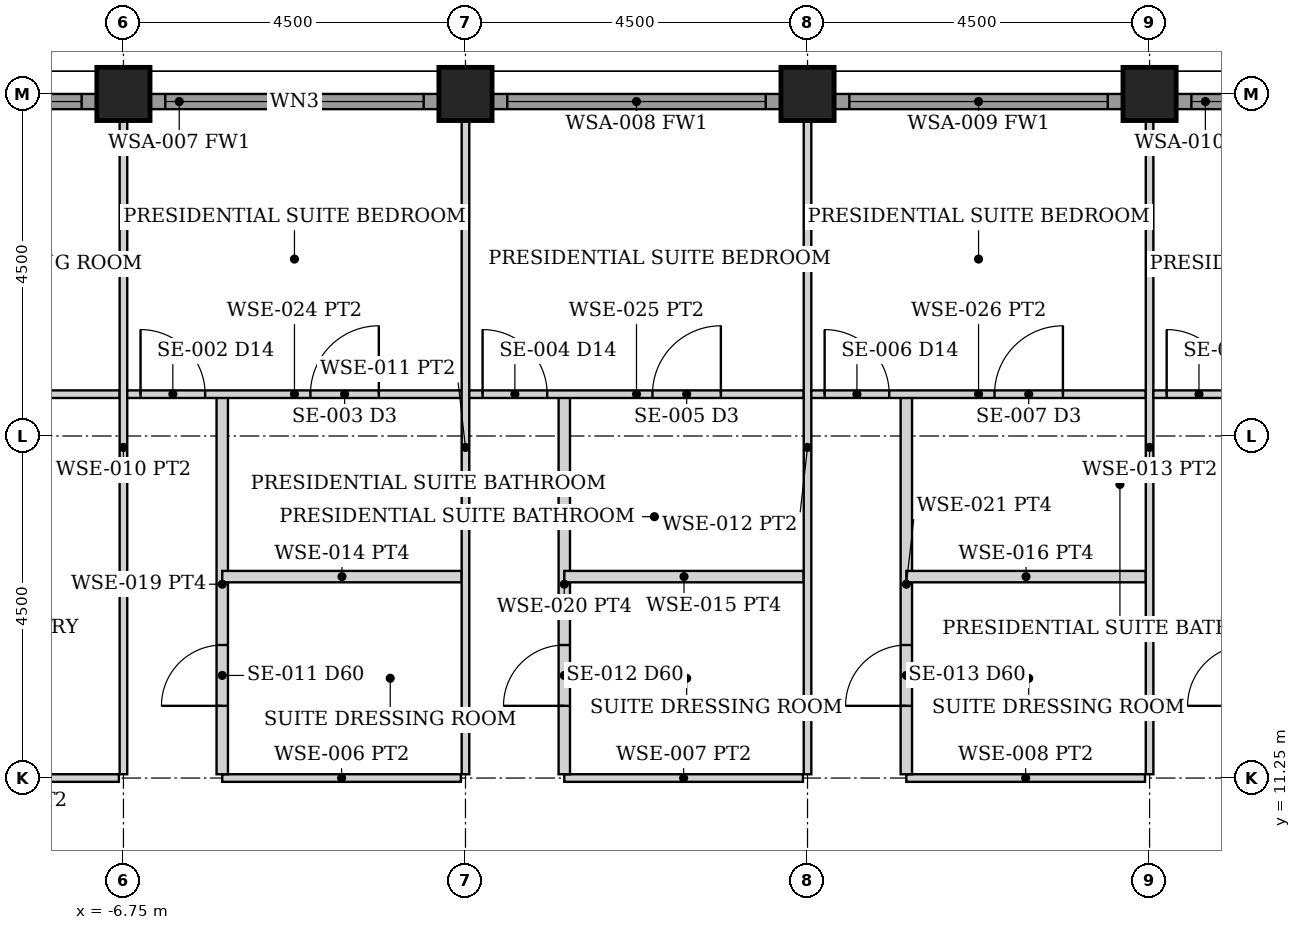
"""IFC4 building model, lengths in metres.
Left out: names, types, materials, properties, quantities, classifications, styles, units other than length and angle.
Written with IfcOpenShell. Run it as: python <this file> out.ifc"""

import sys

from ifc_helpers import new_model, si_unit, direction, frame, frame_2d, origin, origin_2d, place, context, subcontext, project, spatial, rectangle, hollow_rectangle, extrude, element, fill, save


model = new_model("IFC4")
c1 = context("Model", 3, precision=1e-05, world=origin(), true_north=direction((0.0, 1.0)))
c2 = subcontext(c1, "Body", "Model", "MODEL_VIEW")
j1 = project(units=[si_unit("LENGTHUNIT", "METRE"), si_unit("PLANEANGLEUNIT", "RADIAN")], contexts=[c1])
p1 = place(None, origin())
s1 = spatial("IfcSite", under=j1, at=p1, CompositionType="ELEMENT")
p2 = place(p1, origin())
s2 = spatial("IfcBuilding", under=s1, at=p2, CompositionType="ELEMENT")
p3 = place(p2, frame((0.0, 0.0, 245.8)))
s3 = spatial("IfcBuildingStorey", under=s2, at=p3, CompositionType="ELEMENT", Elevation=245.8)
for number, where, z_axis, x_axis in (
    (1, (-6.75, 20.25, 0.0), (0.0, 0.0, 1.0), (0.0, 1.0, 0.0)),
    (2, (-2.25, 20.25, 0.0), (0.0, 0.0, 1.0), (0.0, 1.0, 0.0)),
    (3, (2.25, 20.25, 0.0), (0.0, 0.0, 1.0), (0.0, 1.0, 0.0)),
    (4, (6.75, 20.25, 0.0), (0.0, 0.0, 1.0), (0.0, 1.0, 0.0)),
):
    element("IfcColumn", number, at=place(p3, frame(where, z_axis=z_axis, x_axis=x_axis)), inside=s3, PredefinedType="COLUMN", context=c2, shape_type="SweptSolid", body=[
        extrude(hollow_rectangle(XDim=0.7, YDim=0.7, WallThickness=0.035, at=origin_2d()), origin(), (0.0, 0.0, 1.0), 3.75),
    ])
p4 = place(p3, frame((-10.895, 20.15, 0.0), z_axis=(0.0, 0.0, 1.0), x_axis=(1.0, 0.0, 0.0)))
e5 = element("IfcWall", 5, at=p4, inside=s3, PredefinedType="SOLIDWALL", context=c2, shape_type="SweptSolid", body=[
    extrude(rectangle(XDim=3.79, YDim=0.2, at=frame_2d((1.895, 0.0))), origin(), (0.0, 0.0, 1.0), 2.629),
])
p5 = place(p4, frame((0.195, 0.0, 0.3)))
e6 = element("IfcOpeningElement", 6, at=p5, cuts=e5, PredefinedType="OPENING", context=c2, shape_type="SweptSolid", body=[
    extrude(rectangle(XDim=3.4, YDim=2.179, at=frame_2d((1.7, 1.089))), frame((0.0, 0.11, 0.0), z_axis=(0.0, -1.0, 0.0), x_axis=(1.0, 0.0, 0.0)), (0.0, 0.0, 1.0), 0.22),
])
p6 = place(p3, frame((-6.395, 20.15, 0.0), z_axis=(0.0, 0.0, 1.0), x_axis=(1.0, 0.0, 0.0)))
e7 = element("IfcWall", 7, at=p6, inside=s3, PredefinedType="SOLIDWALL", context=c2, shape_type="SweptSolid", body=[
    extrude(rectangle(XDim=3.79, YDim=0.2, at=frame_2d((1.895, 0.0))), origin(), (0.0, 0.0, 1.0), 2.629),
])
p7 = place(p6, frame((0.195, 0.0, 0.3)))
e8 = element("IfcOpeningElement", 8, at=p7, cuts=e7, PredefinedType="OPENING", context=c2, shape_type="SweptSolid", body=[
    extrude(rectangle(XDim=3.4, YDim=2.179, at=frame_2d((1.7, 1.089))), frame((0.0, 0.11, 0.0), z_axis=(0.0, -1.0, 0.0), x_axis=(1.0, 0.0, 0.0)), (0.0, 0.0, 1.0), 0.22),
])
p8 = place(p3, frame((-1.895, 20.15, 0.0), z_axis=(0.0, 0.0, 1.0), x_axis=(1.0, 0.0, 0.0)))
e9 = element("IfcWall", 9, at=p8, inside=s3, PredefinedType="SOLIDWALL", context=c2, shape_type="SweptSolid", body=[
    extrude(rectangle(XDim=3.79, YDim=0.2, at=frame_2d((1.895, 0.0))), origin(), (0.0, 0.0, 1.0), 2.629),
])
p9 = place(p8, frame((0.195, 0.0, 0.3)))
e10 = element("IfcOpeningElement", 10, at=p9, cuts=e9, PredefinedType="OPENING", context=c2, shape_type="SweptSolid", body=[
    extrude(rectangle(XDim=3.4, YDim=2.179, at=frame_2d((1.7, 1.089))), frame((0.0, 0.11, 0.0), z_axis=(0.0, -1.0, 0.0), x_axis=(1.0, 0.0, 0.0)), (0.0, 0.0, 1.0), 0.22),
])
p10 = place(p3, frame((2.605, 20.15, 0.0), z_axis=(0.0, 0.0, 1.0), x_axis=(1.0, 0.0, 0.0)))
e11 = element("IfcWall", 11, at=p10, inside=s3, PredefinedType="SOLIDWALL", context=c2, shape_type="SweptSolid", body=[
    extrude(rectangle(XDim=3.79, YDim=0.2, at=frame_2d((1.895, 0.0))), origin(), (0.0, 0.0, 1.0), 2.629),
])
p11 = place(p10, frame((0.195, 0.0, 0.3)))
e12 = element("IfcOpeningElement", 12, at=p11, cuts=e11, PredefinedType="OPENING", context=c2, shape_type="SweptSolid", body=[
    extrude(rectangle(XDim=3.4, YDim=2.179, at=frame_2d((1.7, 1.089))), frame((0.0, 0.11, 0.0), z_axis=(0.0, -1.0, 0.0), x_axis=(1.0, 0.0, 0.0)), (0.0, 0.0, 1.0), 0.22),
])
p12 = place(p3, frame((7.105, 20.15, 0.0), z_axis=(0.0, 0.0, 1.0), x_axis=(1.0, 0.0, 0.0)))
e13 = element("IfcWall", 13, at=p12, inside=s3, PredefinedType="SOLIDWALL", context=c2, shape_type="SweptSolid", body=[
    extrude(rectangle(XDim=3.79, YDim=0.2, at=frame_2d((1.895, 0.0))), origin(), (0.0, 0.0, 1.0), 2.629),
])
p13 = place(p12, frame((0.195, 0.0, 0.3)))
e14 = element("IfcOpeningElement", 14, at=p13, cuts=e13, PredefinedType="OPENING", context=c2, shape_type="SweptSolid", body=[
    extrude(rectangle(XDim=3.4, YDim=2.179, at=frame_2d((1.7, 1.089))), frame((0.0, 0.11, 0.0), z_axis=(0.0, -1.0, 0.0), x_axis=(1.0, 0.0, 0.0)), (0.0, 0.0, 1.0), 0.22),
])
p14 = place(p3, frame((-9.95, 11.25, 0.0), z_axis=(0.0, 0.0, 1.0), x_axis=(1.0, 0.0, 0.0)))
e15 = element("IfcWall", 15, at=p14, inside=s3, PredefinedType="PARTITIONING", context=c2, shape_type="SweptSolid", body=[
    extrude(rectangle(XDim=3.14, YDim=0.1, at=frame_2d((1.57, 0.0))), origin(), (0.0, 0.0, 1.0), 2.629),
])
p15 = place(p3, frame((-11.19, 16.3, 0.0), z_axis=(0.0, 0.0, 1.0), x_axis=(1.0, 0.0, 0.0)))
e16 = element("IfcWall", 16, at=p15, inside=s3, PredefinedType="PARTITIONING", context=c2, shape_type="SweptSolid", body=[
    extrude(rectangle(XDim=4.39, YDim=0.1, at=frame_2d((2.195, 0.0))), origin(), (0.0, 0.0, 1.0), 2.629),
])
p16 = place(p15, frame((0.14, 0.0, 0.0)))
e17 = element("IfcOpeningElement", 17, at=p16, cuts=e16, PredefinedType="OPENING", context=c2, shape_type="SweptSolid", body=[
    extrude(rectangle(XDim=0.9, YDim=2.1, at=frame_2d((0.45, 1.05))), frame((0.0, 0.06, 0.0), z_axis=(0.0, -1.0, 0.0), x_axis=(1.0, 0.0, 0.0)), (0.0, 0.0, 1.0), 0.12),
])
p17 = place(p3, frame((-6.75, 11.3, 0.0), z_axis=(0.0, 0.0, 1.0), x_axis=(0.0, 1.0, 0.0)))
e18 = element("IfcWall", 18, at=p17, inside=s3, PredefinedType="PARTITIONING", context=c2, shape_type="SweptSolid", body=[
    extrude(rectangle(XDim=8.6, YDim=0.1, at=frame_2d((4.3, 0.0))), origin(), (0.0, 0.0, 1.0), 2.629),
])
p18 = place(p3, frame((-5.45, 11.25, 0.0), z_axis=(0.0, 0.0, 1.0), x_axis=(1.0, 0.0, 0.0)))
e19 = element("IfcWall", 19, at=p18, inside=s3, PredefinedType="PARTITIONING", context=c2, shape_type="SweptSolid", body=[
    extrude(rectangle(XDim=3.14, YDim=0.1, at=frame_2d((1.57, 0.0))), origin(), (0.0, 0.0, 1.0), 2.629),
])
p19 = place(p3, frame((-5.45, 11.3, 0.0), z_axis=(0.0, 0.0, 1.0), x_axis=(0.0, 1.0, 0.0)))
e20 = element("IfcWall", 20, at=p19, inside=s3, PredefinedType="PARTITIONING", context=c2, shape_type="SweptSolid", body=[
    extrude(rectangle(XDim=5.0, YDim=0.15, at=frame_2d((2.5, 0.0))), origin(), (0.0, 0.0, 1.0), 2.629),
])
p20 = place(p19, frame((0.9, 0.0, 0.0)))
e21 = element("IfcOpeningElement", 21, at=p20, cuts=e20, PredefinedType="OPENING", context=c2, shape_type="SweptSolid", body=[
    extrude(rectangle(XDim=0.8, YDim=2.1, at=frame_2d((0.4, 1.05))), frame((0.0, 0.085, 0.0), z_axis=(0.0, -1.0, 0.0), x_axis=(1.0, 0.0, 0.0)), (0.0, 0.0, 1.0), 0.17),
])
p21 = place(p3, frame((-6.7, 16.3, 0.0), z_axis=(0.0, 0.0, 1.0), x_axis=(1.0, 0.0, 0.0)))
e22 = element("IfcWall", 22, at=p21, inside=s3, PredefinedType="PARTITIONING", context=c2, shape_type="SweptSolid", body=[
    extrude(rectangle(XDim=4.4, YDim=0.1, at=frame_2d((2.2, 0.0))), origin(), (0.0, 0.0, 1.0), 2.629),
])
p22 = place(p21, frame((0.175, 0.0, 0.0)))
e23 = element("IfcOpeningElement", 23, at=p22, cuts=e22, PredefinedType="OPENING", context=c2, shape_type="SweptSolid", body=[
    extrude(rectangle(XDim=0.85, YDim=2.1, at=frame_2d((0.425, 1.05))), frame((0.0, 0.06, 0.0), z_axis=(0.0, -1.0, 0.0), x_axis=(1.0, 0.0, 0.0)), (0.0, 0.0, 1.0), 0.12),
])
p23 = place(p21, frame((2.41, 0.0, 0.0)))
e24 = element("IfcOpeningElement", 24, at=p23, cuts=e22, PredefinedType="OPENING", context=c2, shape_type="SweptSolid", body=[
    extrude(rectangle(XDim=0.9, YDim=2.1, at=frame_2d((0.45, 1.05))), frame((0.0, 0.06, 0.0), z_axis=(0.0, -1.0, 0.0), x_axis=(1.0, 0.0, 0.0)), (0.0, 0.0, 1.0), 0.12),
])
p24 = place(p3, frame((-5.45, 13.9, 0.0), z_axis=(0.0, 0.0, 1.0), x_axis=(1.0, 0.0, 0.0)))
e25 = element("IfcWall", 25, at=p24, inside=s3, PredefinedType="PARTITIONING", context=c2, shape_type="SweptSolid", body=[
    extrude(rectangle(XDim=3.15, YDim=0.15, at=frame_2d((1.575, 0.0))), origin(), (0.0, 0.0, 1.0), 2.629),
])
p25 = place(p3, frame((-2.25, 11.3, 0.0), z_axis=(0.0, 0.0, 1.0), x_axis=(0.0, 1.0, 0.0)))
e26 = element("IfcWall", 26, at=p25, inside=s3, PredefinedType="PARTITIONING", context=c2, shape_type="SweptSolid", body=[
    extrude(rectangle(XDim=8.6, YDim=0.1, at=frame_2d((4.3, 0.0))), origin(), (0.0, 0.0, 1.0), 2.629),
])
p26 = place(p3, frame((-0.95, 11.25, 0.0), z_axis=(0.0, 0.0, 1.0), x_axis=(1.0, 0.0, 0.0)))
e27 = element("IfcWall", 27, at=p26, inside=s3, PredefinedType="PARTITIONING", context=c2, shape_type="SweptSolid", body=[
    extrude(rectangle(XDim=3.14, YDim=0.1, at=frame_2d((1.57, 0.0))), origin(), (0.0, 0.0, 1.0), 2.629),
])
p27 = place(p3, frame((-0.95, 11.3, 0.0), z_axis=(0.0, 0.0, 1.0), x_axis=(0.0, 1.0, 0.0)))
e28 = element("IfcWall", 28, at=p27, inside=s3, PredefinedType="PARTITIONING", context=c2, shape_type="SweptSolid", body=[
    extrude(rectangle(XDim=5.0, YDim=0.15, at=frame_2d((2.5, 0.0))), origin(), (0.0, 0.0, 1.0), 2.629),
])
p28 = place(p27, frame((0.9, 0.0, 0.0)))
e29 = element("IfcOpeningElement", 29, at=p28, cuts=e28, PredefinedType="OPENING", context=c2, shape_type="SweptSolid", body=[
    extrude(rectangle(XDim=0.8, YDim=2.1, at=frame_2d((0.4, 1.05))), frame((0.0, 0.085, 0.0), z_axis=(0.0, -1.0, 0.0), x_axis=(1.0, 0.0, 0.0)), (0.0, 0.0, 1.0), 0.17),
])
p29 = place(p3, frame((-2.2, 16.3, 0.0), z_axis=(0.0, 0.0, 1.0), x_axis=(1.0, 0.0, 0.0)))
e30 = element("IfcWall", 30, at=p29, inside=s3, PredefinedType="PARTITIONING", context=c2, shape_type="SweptSolid", body=[
    extrude(rectangle(XDim=4.4, YDim=0.1, at=frame_2d((2.2, 0.0))), origin(), (0.0, 0.0, 1.0), 2.629),
])
p30 = place(p29, frame((0.175, 0.0, 0.0)))
e31 = element("IfcOpeningElement", 31, at=p30, cuts=e30, PredefinedType="OPENING", context=c2, shape_type="SweptSolid", body=[
    extrude(rectangle(XDim=0.85, YDim=2.1, at=frame_2d((0.425, 1.05))), frame((0.0, 0.06, 0.0), z_axis=(0.0, -1.0, 0.0), x_axis=(1.0, 0.0, 0.0)), (0.0, 0.0, 1.0), 0.12),
])
p31 = place(p29, frame((2.41, 0.0, 0.0)))
e32 = element("IfcOpeningElement", 32, at=p31, cuts=e30, PredefinedType="OPENING", context=c2, shape_type="SweptSolid", body=[
    extrude(rectangle(XDim=0.9, YDim=2.1, at=frame_2d((0.45, 1.05))), frame((0.0, 0.06, 0.0), z_axis=(0.0, -1.0, 0.0), x_axis=(1.0, 0.0, 0.0)), (0.0, 0.0, 1.0), 0.12),
])
p32 = place(p3, frame((-0.95, 13.9, 0.0), z_axis=(0.0, 0.0, 1.0), x_axis=(1.0, 0.0, 0.0)))
e33 = element("IfcWall", 33, at=p32, inside=s3, PredefinedType="PARTITIONING", context=c2, shape_type="SweptSolid", body=[
    extrude(rectangle(XDim=3.15, YDim=0.15, at=frame_2d((1.575, 0.0))), origin(), (0.0, 0.0, 1.0), 2.629),
])
p33 = place(p3, frame((2.25, 11.3, 0.0), z_axis=(0.0, 0.0, 1.0), x_axis=(0.0, 1.0, 0.0)))
e34 = element("IfcWall", 34, at=p33, inside=s3, PredefinedType="PARTITIONING", context=c2, shape_type="SweptSolid", body=[
    extrude(rectangle(XDim=8.6, YDim=0.1, at=frame_2d((4.3, 0.0))), origin(), (0.0, 0.0, 1.0), 2.629),
])
p34 = place(p3, frame((3.55, 11.25, 0.0), z_axis=(0.0, 0.0, 1.0), x_axis=(1.0, 0.0, 0.0)))
e35 = element("IfcWall", 35, at=p34, inside=s3, PredefinedType="PARTITIONING", context=c2, shape_type="SweptSolid", body=[
    extrude(rectangle(XDim=3.14, YDim=0.1, at=frame_2d((1.57, 0.0))), origin(), (0.0, 0.0, 1.0), 2.629),
])
p35 = place(p3, frame((3.55, 11.3, 0.0), z_axis=(0.0, 0.0, 1.0), x_axis=(0.0, 1.0, 0.0)))
e36 = element("IfcWall", 36, at=p35, inside=s3, PredefinedType="PARTITIONING", context=c2, shape_type="SweptSolid", body=[
    extrude(rectangle(XDim=5.0, YDim=0.15, at=frame_2d((2.5, 0.0))), origin(), (0.0, 0.0, 1.0), 2.629),
])
p36 = place(p35, frame((0.9, 0.0, 0.0)))
e37 = element("IfcOpeningElement", 37, at=p36, cuts=e36, PredefinedType="OPENING", context=c2, shape_type="SweptSolid", body=[
    extrude(rectangle(XDim=0.8, YDim=2.1, at=frame_2d((0.4, 1.05))), frame((0.0, 0.085, 0.0), z_axis=(0.0, -1.0, 0.0), x_axis=(1.0, 0.0, 0.0)), (0.0, 0.0, 1.0), 0.17),
])
p37 = place(p3, frame((2.3, 16.3, 0.0), z_axis=(0.0, 0.0, 1.0), x_axis=(1.0, 0.0, 0.0)))
e38 = element("IfcWall", 38, at=p37, inside=s3, PredefinedType="PARTITIONING", context=c2, shape_type="SweptSolid", body=[
    extrude(rectangle(XDim=4.4, YDim=0.1, at=frame_2d((2.2, 0.0))), origin(), (0.0, 0.0, 1.0), 2.629),
])
p38 = place(p37, frame((0.175, 0.0, 0.0)))
e39 = element("IfcOpeningElement", 39, at=p38, cuts=e38, PredefinedType="OPENING", context=c2, shape_type="SweptSolid", body=[
    extrude(rectangle(XDim=0.85, YDim=2.1, at=frame_2d((0.425, 1.05))), frame((0.0, 0.06, 0.0), z_axis=(0.0, -1.0, 0.0), x_axis=(1.0, 0.0, 0.0)), (0.0, 0.0, 1.0), 0.12),
])
p39 = place(p37, frame((2.41, 0.0, 0.0)))
e40 = element("IfcOpeningElement", 40, at=p39, cuts=e38, PredefinedType="OPENING", context=c2, shape_type="SweptSolid", body=[
    extrude(rectangle(XDim=0.9, YDim=2.1, at=frame_2d((0.45, 1.05))), frame((0.0, 0.06, 0.0), z_axis=(0.0, -1.0, 0.0), x_axis=(1.0, 0.0, 0.0)), (0.0, 0.0, 1.0), 0.12),
])
p40 = place(p3, frame((3.55, 13.9, 0.0), z_axis=(0.0, 0.0, 1.0), x_axis=(1.0, 0.0, 0.0)))
e41 = element("IfcWall", 41, at=p40, inside=s3, PredefinedType="PARTITIONING", context=c2, shape_type="SweptSolid", body=[
    extrude(rectangle(XDim=3.15, YDim=0.15, at=frame_2d((1.575, 0.0))), origin(), (0.0, 0.0, 1.0), 2.629),
])
p41 = place(p3, frame((6.75, 11.3, 0.0), z_axis=(0.0, 0.0, 1.0), x_axis=(0.0, 1.0, 0.0)))
e42 = element("IfcWall", 42, at=p41, inside=s3, PredefinedType="PARTITIONING", context=c2, shape_type="SweptSolid", body=[
    extrude(rectangle(XDim=8.6, YDim=0.1, at=frame_2d((4.3, 0.0))), origin(), (0.0, 0.0, 1.0), 2.629),
])
p42 = place(p3, frame((6.8, 16.3, 0.0), z_axis=(0.0, 0.0, 1.0), x_axis=(1.0, 0.0, 0.0)))
e43 = element("IfcWall", 43, at=p42, inside=s3, PredefinedType="PARTITIONING", context=c2, shape_type="SweptSolid", body=[
    extrude(rectangle(XDim=4.39, YDim=0.1, at=frame_2d((2.195, 0.0))), origin(), (0.0, 0.0, 1.0), 2.629),
])
p43 = place(p42, frame((0.175, 0.0, 0.0)))
e44 = element("IfcOpeningElement", 44, at=p43, cuts=e43, PredefinedType="OPENING", context=c2, shape_type="SweptSolid", body=[
    extrude(rectangle(XDim=0.85, YDim=2.1, at=frame_2d((0.425, 1.05))), frame((0.0, 0.06, 0.0), z_axis=(0.0, -1.0, 0.0), x_axis=(1.0, 0.0, 0.0)), (0.0, 0.0, 1.0), 0.12),
])
p44 = place(p42, frame((2.41, 0.0, 0.0)))
e45 = element("IfcOpeningElement", 45, at=p44, cuts=e43, PredefinedType="OPENING", context=c2, shape_type="SweptSolid", body=[
    extrude(rectangle(XDim=0.9, YDim=2.1, at=frame_2d((0.45, 1.05))), frame((0.0, 0.06, 0.0), z_axis=(0.0, -1.0, 0.0), x_axis=(1.0, 0.0, 0.0)), (0.0, 0.0, 1.0), 0.12),
])
p45 = place(p5, origin())
e46 = element("IfcWindow", 46, at=p45, inside=s3, PartitioningType="SINGLE_PANEL", PredefinedType="WINDOW", context=c2, shape_type="SweptSolid", body=[
    extrude(rectangle(XDim=3.4, YDim=2.179, at=frame_2d((1.7, 1.089))), frame((0.0, 0.03, 0.0), z_axis=(0.0, -1.0, 0.0), x_axis=(1.0, 0.0, 0.0)), (0.0, 0.0, 1.0), 0.06),
])
fill(e6, e46)
p46 = place(p7, origin())
e47 = element("IfcWindow", 47, at=p46, inside=s3, PartitioningType="SINGLE_PANEL", PredefinedType="WINDOW", context=c2, shape_type="SweptSolid", body=[
    extrude(rectangle(XDim=3.4, YDim=2.179, at=frame_2d((1.7, 1.089))), frame((0.0, 0.03, 0.0), z_axis=(0.0, -1.0, 0.0), x_axis=(1.0, 0.0, 0.0)), (0.0, 0.0, 1.0), 0.06),
])
fill(e8, e47)
p47 = place(p9, origin())
e48 = element("IfcWindow", 48, at=p47, inside=s3, PartitioningType="SINGLE_PANEL", PredefinedType="WINDOW", context=c2, shape_type="SweptSolid", body=[
    extrude(rectangle(XDim=3.4, YDim=2.179, at=frame_2d((1.7, 1.089))), frame((0.0, 0.03, 0.0), z_axis=(0.0, -1.0, 0.0), x_axis=(1.0, 0.0, 0.0)), (0.0, 0.0, 1.0), 0.06),
])
fill(e10, e48)
p48 = place(p11, origin())
e49 = element("IfcWindow", 49, at=p48, inside=s3, PartitioningType="SINGLE_PANEL", PredefinedType="WINDOW", context=c2, shape_type="SweptSolid", body=[
    extrude(rectangle(XDim=3.4, YDim=2.179, at=frame_2d((1.7, 1.089))), frame((0.0, 0.03, 0.0), z_axis=(0.0, -1.0, 0.0), x_axis=(1.0, 0.0, 0.0)), (0.0, 0.0, 1.0), 0.06),
])
fill(e12, e49)
p49 = place(p13, origin())
e50 = element("IfcWindow", 50, at=p49, inside=s3, PartitioningType="SINGLE_PANEL", PredefinedType="WINDOW", context=c2, shape_type="SweptSolid", body=[
    extrude(rectangle(XDim=3.4, YDim=2.179, at=frame_2d((1.7, 1.089))), frame((0.0, 0.03, 0.0), z_axis=(0.0, -1.0, 0.0), x_axis=(1.0, 0.0, 0.0)), (0.0, 0.0, 1.0), 0.06),
])
fill(e14, e50)
p50 = place(p22, origin())
e51 = element("IfcDoor", 51, at=p50, inside=s3, OperationType="SINGLE_SWING_LEFT", PredefinedType="DOOR", context=c2, shape_type="SweptSolid", body=[
    extrude(rectangle(XDim=0.85, YDim=2.1, at=frame_2d((0.425, 1.05))), frame((0.0, 0.025, 0.0), z_axis=(0.0, -1.0, 0.0), x_axis=(1.0, 0.0, 0.0)), (0.0, 0.0, 1.0), 0.05),
])
fill(e23, e51)
p51 = place(p20, origin())
e52 = element("IfcDoor", 52, at=p51, inside=s3, OperationType="SINGLE_SWING_LEFT", PredefinedType="DOOR", context=c2, shape_type="SweptSolid", body=[
    extrude(rectangle(XDim=0.8, YDim=2.1, at=frame_2d((0.4, 1.05))), frame((0.0, 0.025, 0.0), z_axis=(0.0, -1.0, 0.0), x_axis=(1.0, 0.0, 0.0)), (0.0, 0.0, 1.0), 0.05),
])
fill(e21, e52)
p52 = place(p23, origin())
e53 = element("IfcDoor", 53, at=p52, inside=s3, OperationType="SINGLE_SWING_RIGHT", PredefinedType="DOOR", context=c2, shape_type="SweptSolid", body=[
    extrude(rectangle(XDim=0.9, YDim=2.1, at=frame_2d((0.45, 1.05))), frame((0.0, 0.025, 0.0), z_axis=(0.0, -1.0, 0.0), x_axis=(1.0, 0.0, 0.0)), (0.0, 0.0, 1.0), 0.05),
])
fill(e24, e53)
p53 = place(p30, origin())
e54 = element("IfcDoor", 54, at=p53, inside=s3, OperationType="SINGLE_SWING_LEFT", PredefinedType="DOOR", context=c2, shape_type="SweptSolid", body=[
    extrude(rectangle(XDim=0.85, YDim=2.1, at=frame_2d((0.425, 1.05))), frame((0.0, 0.025, 0.0), z_axis=(0.0, -1.0, 0.0), x_axis=(1.0, 0.0, 0.0)), (0.0, 0.0, 1.0), 0.05),
])
fill(e31, e54)
p54 = place(p28, origin())
e55 = element("IfcDoor", 55, at=p54, inside=s3, OperationType="SINGLE_SWING_LEFT", PredefinedType="DOOR", context=c2, shape_type="SweptSolid", body=[
    extrude(rectangle(XDim=0.8, YDim=2.1, at=frame_2d((0.4, 1.05))), frame((0.0, 0.025, 0.0), z_axis=(0.0, -1.0, 0.0), x_axis=(1.0, 0.0, 0.0)), (0.0, 0.0, 1.0), 0.05),
])
fill(e29, e55)
p55 = place(p31, origin())
e56 = element("IfcDoor", 56, at=p55, inside=s3, OperationType="SINGLE_SWING_RIGHT", PredefinedType="DOOR", context=c2, shape_type="SweptSolid", body=[
    extrude(rectangle(XDim=0.9, YDim=2.1, at=frame_2d((0.45, 1.05))), frame((0.0, 0.025, 0.0), z_axis=(0.0, -1.0, 0.0), x_axis=(1.0, 0.0, 0.0)), (0.0, 0.0, 1.0), 0.05),
])
fill(e32, e56)
p56 = place(p38, origin())
e57 = element("IfcDoor", 57, at=p56, inside=s3, OperationType="SINGLE_SWING_LEFT", PredefinedType="DOOR", context=c2, shape_type="SweptSolid", body=[
    extrude(rectangle(XDim=0.85, YDim=2.1, at=frame_2d((0.425, 1.05))), frame((0.0, 0.025, 0.0), z_axis=(0.0, -1.0, 0.0), x_axis=(1.0, 0.0, 0.0)), (0.0, 0.0, 1.0), 0.05),
])
fill(e39, e57)
p57 = place(p36, origin())
e58 = element("IfcDoor", 58, at=p57, inside=s3, OperationType="SINGLE_SWING_LEFT", PredefinedType="DOOR", context=c2, shape_type="SweptSolid", body=[
    extrude(rectangle(XDim=0.8, YDim=2.1, at=frame_2d((0.4, 1.05))), frame((0.0, 0.025, 0.0), z_axis=(0.0, -1.0, 0.0), x_axis=(1.0, 0.0, 0.0)), (0.0, 0.0, 1.0), 0.05),
])
fill(e37, e58)
p58 = place(p39, origin())
e59 = element("IfcDoor", 59, at=p58, inside=s3, OperationType="SINGLE_SWING_RIGHT", PredefinedType="DOOR", context=c2, shape_type="SweptSolid", body=[
    extrude(rectangle(XDim=0.9, YDim=2.1, at=frame_2d((0.45, 1.05))), frame((0.0, 0.025, 0.0), z_axis=(0.0, -1.0, 0.0), x_axis=(1.0, 0.0, 0.0)), (0.0, 0.0, 1.0), 0.05),
])
fill(e40, e59)
p59 = place(p43, origin())
e60 = element("IfcDoor", 60, at=p59, inside=s3, OperationType="SINGLE_SWING_LEFT", PredefinedType="DOOR", context=c2, shape_type="SweptSolid", body=[
    extrude(rectangle(XDim=0.85, YDim=2.1, at=frame_2d((0.425, 1.05))), frame((0.0, 0.025, 0.0), z_axis=(0.0, -1.0, 0.0), x_axis=(1.0, 0.0, 0.0)), (0.0, 0.0, 1.0), 0.05),
])
fill(e44, e60)
save(model, sys.argv[1])
